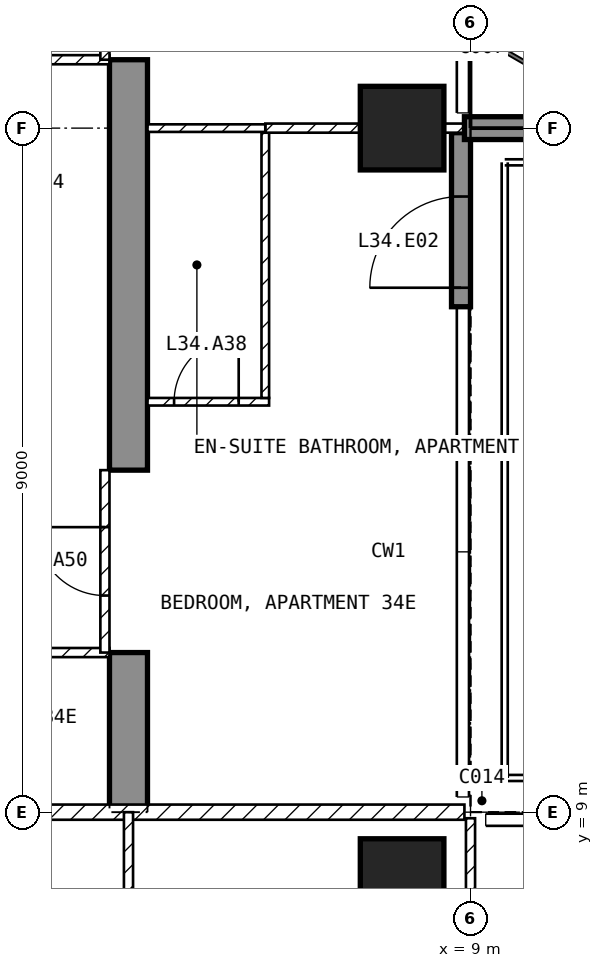
"""IFC4 building model, lengths in metres.
Left out: names, types, materials, properties, quantities, classifications, styles, units other than length and angle.
Written with IfcOpenShell. Run it as: python <this file> out.ifc"""

import sys

from ifc_helpers import new_model, si_unit, direction, frame, frame_2d, origin, origin_2d, place, context, subcontext, project, spatial, polyline, rectangle, outline, extrude, element, fill, save


model = new_model("IFC4")
c1 = context("Model", 3, precision=1e-05, world=origin(), true_north=direction((0.0, 1.0)))
c2 = subcontext(c1, "Body", "Model", "MODEL_VIEW")
j1 = project(units=[si_unit("LENGTHUNIT", "METRE"), si_unit("PLANEANGLEUNIT", "RADIAN")], contexts=[c1])
p1 = place(None, origin())
s1 = spatial("IfcSite", under=j1, at=p1, CompositionType="ELEMENT")
p2 = place(p1, origin())
s2 = spatial("IfcBuilding", under=s1, at=p2, CompositionType="ELEMENT")
p3 = place(p2, frame((0.0, 0.0, 140.9)))
s3 = spatial("IfcBuildingStorey", under=s2, at=p3, CompositionType="ELEMENT", Elevation=140.9)
for number, where, z_axis, x_axis in (
    (1, (8.1, 8.1, -0.25), (0.0, 0.0, 1.0), (1.0, 0.0, 0.0)),
    (2, (8.1, 18.0, -0.25), (0.0, 0.0, 1.0), (1.0, 0.0, 0.0)),
):
    element("IfcColumn", number, at=place(p3, frame(where, z_axis=z_axis, x_axis=x_axis)), inside=s3, PredefinedType="COLUMN", context=c2, shape_type="SweptSolid", body=[
        extrude(rectangle(XDim=1.1, YDim=1.1, at=origin_2d()), origin(), (0.0, 0.0, 1.0), 3.5),
    ])
p4 = place(p3, frame((4.25, 9.0, -0.25), z_axis=(1.0, 0.0, 0.0), x_axis=(0.0, 1.0, 0.0)))
e3 = element("IfcWall", 3, at=p4, inside=s3, PredefinedType="SHEAR", context=c2, shape_type="SweptSolid", body=[
    extrude(outline(polyline([(0.0, 0.0), (2.1, 0.0), (2.1, 2.65), (4.5, 2.65), (4.5, 0.0), (9.9, 0.0), (9.9, 2.65), (12.3, 2.65), (12.3, 0.0), (16.55, 0.0), (16.55, 3.5), (0.0, 3.5), (0.0, 0.0)])), origin(), (0.0, 0.0, 1.0), 0.5),
])
p5 = place(p3, frame((8.875, 15.65, 0.0), z_axis=(0.0, 0.0, 1.0), x_axis=(0.0, 1.0, 0.0)))
e4 = element("IfcWall", 4, at=p5, inside=s3, PredefinedType="SOLIDWALL", context=c2, shape_type="SweptSolid", body=[
    extrude(rectangle(XDim=2.29, YDim=0.25, at=frame_2d((1.145, 0.0))), origin(), (0.0, 0.0, 1.0), 3.25),
])
p6 = place(p5, frame((0.25, 0.0, 0.0)))
e5 = element("IfcOpeningElement", 5, at=p6, cuts=e4, PredefinedType="OPENING", context=c2, shape_type="SweptSolid", body=[
    extrude(rectangle(XDim=1.2, YDim=2.4, at=frame_2d((0.6, 1.2))), frame((0.0, 0.135, 0.0), z_axis=(0.0, -1.0, 0.0), x_axis=(1.0, 0.0, 0.0)), (0.0, 0.0, 1.0), 0.27),
])
p7 = place(p3, frame((8.92, 18.0, 0.0), z_axis=(0.0, 0.0, 1.0), x_axis=(1.0, 0.0, 0.0)))
e6 = element("IfcWall", 6, at=p7, inside=s3, PredefinedType="SOLIDWALL", context=c2, shape_type="SweptSolid", body=[
    extrude(rectangle(XDim=2.82, YDim=0.3, at=frame_2d((1.41, 0.0))), origin(), (0.0, 0.0, 1.0), 3.25),
])
p8 = place(p3, frame((-8.92, 9.0, 0.0), z_axis=(0.0, 0.0, 1.0), x_axis=(1.0, 0.0, 0.0)))
e7 = element("IfcWall", 7, at=p8, inside=s3, PredefinedType="PARTITIONING", context=c2, shape_type="SweptSolid", body=[
    extrude(rectangle(XDim=17.84, YDim=0.2, at=frame_2d((8.92, 0.0))), origin(), (0.0, 0.0, 1.0), 3.25),
])
p9 = place(p8, frame((8.42, 0.0, 0.0)))
e8 = element("IfcOpeningElement", 8, at=p9, cuts=e7, PredefinedType="OPENING", context=c2, shape_type="SweptSolid", body=[
    extrude(rectangle(XDim=1.0, YDim=2.1, at=frame_2d((0.5, 1.05))), frame((0.0, 0.11, 0.0), z_axis=(0.0, -1.0, 0.0), x_axis=(1.0, 0.0, 0.0)), (0.0, 0.0, 1.0), 0.22),
])
p10 = place(p3, frame((9.0, 1.3, 0.0), z_axis=(0.0, 0.0, 1.0), x_axis=(0.0, 1.0, 0.0)))
e9 = element("IfcWall", 9, at=p10, inside=s3, PredefinedType="PARTITIONING", context=c2, shape_type="SweptSolid", body=[
    extrude(rectangle(XDim=7.62, YDim=0.12, at=frame_2d((3.81, 0.0))), origin(), (0.0, 0.0, 1.0), 3.25),
])
p11 = place(p10, frame((4.1, 0.0, 0.0)))
e10 = element("IfcOpeningElement", 10, at=p11, cuts=e9, PredefinedType="OPENING", context=c2, shape_type="SweptSolid", body=[
    extrude(rectangle(XDim=0.9, YDim=2.1, at=frame_2d((0.45, 1.05))), frame((0.0, 0.07, 0.0), z_axis=(0.0, -1.0, 0.0), x_axis=(1.0, 0.0, 0.0)), (0.0, 0.0, 1.0), 0.14),
])
p12 = place(p3, frame((4.5, 4.5, 0.0), z_axis=(0.0, 0.0, 1.0), x_axis=(0.0, 1.0, 0.0)))
e11 = element("IfcWall", 11, at=p12, inside=s3, PredefinedType="PARTITIONING", context=c2, shape_type="SweptSolid", body=[
    extrude(rectangle(XDim=4.5, YDim=0.12, at=frame_2d((2.25, 0.0))), origin(), (0.0, 0.0, 1.0), 3.25),
])
p13 = place(p12, frame((1.8, 0.0, 0.0)))
e12 = element("IfcOpeningElement", 12, at=p13, cuts=e11, PredefinedType="OPENING", context=c2, shape_type="SweptSolid", body=[
    extrude(rectangle(XDim=0.9, YDim=2.1, at=frame_2d((0.45, 1.05))), frame((0.0, 0.07, 0.0), z_axis=(0.0, -1.0, 0.0), x_axis=(1.0, 0.0, 0.0)), (0.0, 0.0, 1.0), 0.14),
])
p14 = place(p3, frame((-2.1, 11.1, 0.0), z_axis=(0.0, 0.0, 1.0), x_axis=(1.0, 0.0, 0.0)))
e13 = element("IfcWall", 13, at=p14, inside=s3, PredefinedType="PARTITIONING", context=c2, shape_type="SweptSolid", body=[
    extrude(rectangle(XDim=6.35, YDim=0.12, at=frame_2d((3.175, 0.0))), origin(), (0.0, 0.0, 1.0), 3.25),
])
p15 = place(p14, frame((2.725, 0.0, 0.0)))
e14 = element("IfcOpeningElement", 14, at=p15, cuts=e13, PredefinedType="OPENING", context=c2, shape_type="SweptSolid", body=[
    extrude(rectangle(XDim=0.9, YDim=2.1, at=frame_2d((0.45, 1.05))), frame((0.0, 0.07, 0.0), z_axis=(0.0, -1.0, 0.0), x_axis=(1.0, 0.0, 0.0)), (0.0, 0.0, 1.0), 0.14),
])
p16 = place(p3, frame((-4.25, 18.9, 0.0), z_axis=(0.0, 0.0, 1.0), x_axis=(1.0, 0.0, 0.0)))
e15 = element("IfcWall", 15, at=p16, inside=s3, PredefinedType="PARTITIONING", context=c2, shape_type="SweptSolid", body=[
    extrude(rectangle(XDim=8.5, YDim=0.12, at=frame_2d((4.25, 0.0))), origin(), (0.0, 0.0, 1.0), 3.25),
])
p17 = place(p16, frame((5.675, 0.0, 0.0)))
e16 = element("IfcOpeningElement", 16, at=p17, cuts=e15, PredefinedType="OPENING", context=c2, shape_type="SweptSolid", body=[
    extrude(rectangle(XDim=0.9, YDim=2.1, at=frame_2d((0.45, 1.05))), frame((0.0, 0.07, 0.0), z_axis=(0.0, -1.0, 0.0), x_axis=(1.0, 0.0, 0.0)), (0.0, 0.0, 1.0), 0.14),
])
p18 = place(p3, frame((4.75, 14.4, 0.0), z_axis=(0.0, 0.0, 1.0), x_axis=(1.0, 0.0, 0.0)))
e17 = element("IfcWall", 17, at=p18, inside=s3, PredefinedType="PARTITIONING", context=c2, shape_type="SweptSolid", body=[
    extrude(rectangle(XDim=1.6, YDim=0.1, at=frame_2d((0.8, 0.0))), origin(), (0.0, 0.0, 1.0), 3.25),
])
p19 = place(p18, frame((0.35, 0.0, 0.0)))
e18 = element("IfcOpeningElement", 18, at=p19, cuts=e17, PredefinedType="OPENING", context=c2, shape_type="SweptSolid", body=[
    extrude(rectangle(XDim=0.85, YDim=2.1, at=frame_2d((0.425, 1.05))), frame((0.0, 0.06, 0.0), z_axis=(0.0, -1.0, 0.0), x_axis=(1.0, 0.0, 0.0)), (0.0, 0.0, 1.0), 0.12),
])
p20 = place(p3, frame((6.3, 14.45, 0.0), z_axis=(0.0, 0.0, 1.0), x_axis=(0.0, 1.0, 0.0)))
e19 = element("IfcWall", 19, at=p20, inside=s3, PredefinedType="PARTITIONING", context=c2, shape_type="SweptSolid", body=[
    extrude(rectangle(XDim=3.49, YDim=0.1, at=frame_2d((1.745, 0.0))), origin(), (0.0, 0.0, 1.0), 3.25),
])
p21 = place(p3, frame((6.3, 18.0, 0.0), z_axis=(0.0, 0.0, 1.0), x_axis=(1.0, 0.0, 0.0)))
e20 = element("IfcWall", 20, at=p21, inside=s3, PredefinedType="PARTITIONING", context=c2, shape_type="SweptSolid", body=[
    extrude(rectangle(XDim=2.62, YDim=0.12, at=frame_2d((1.31, 0.0))), origin(), (0.0, 0.0, 1.0), 2.414),
])
p22 = place(p3, frame((4.75, 18.0, 0.0), z_axis=(0.0, 0.0, 1.0), x_axis=(1.0, 0.0, 0.0)))
e21 = element("IfcWall", 21, at=p22, inside=s3, PredefinedType="PARTITIONING", context=c2, shape_type="SweptSolid", body=[
    extrude(rectangle(XDim=1.55, YDim=0.1, at=frame_2d((0.775, 0.0))), origin(), (0.0, 0.0, 1.0), 2.414),
])
p23 = place(p3, frame((4.19, 11.1, 0.0), z_axis=(0.0, 0.0, 1.0), x_axis=(0.0, 1.0, 0.0)))
e22 = element("IfcWall", 22, at=p23, inside=s3, PredefinedType="PARTITIONING", context=c2, shape_type="SweptSolid", body=[
    extrude(rectangle(XDim=2.4, YDim=0.12, at=frame_2d((1.2, 0.0))), origin(), (0.0, 0.0, 1.0), 2.4),
])
p24 = place(p23, frame((0.75, 0.0, 0.0)))
e23 = element("IfcOpeningElement", 23, at=p24, cuts=e22, PredefinedType="OPENING", context=c2, shape_type="SweptSolid", body=[
    extrude(rectangle(XDim=0.9, YDim=2.1, at=frame_2d((0.45, 1.05))), frame((0.0, 0.07, 0.0), z_axis=(0.0, -1.0, 0.0), x_axis=(1.0, 0.0, 0.0)), (0.0, 0.0, 1.0), 0.14),
])
p25 = place(p3, frame((4.19, 18.9, 0.0), z_axis=(0.0, 0.0, 1.0), x_axis=(0.0, 1.0, 0.0)))
e24 = element("IfcWall", 24, at=p25, inside=s3, PredefinedType="PARTITIONING", context=c2, shape_type="SweptSolid", body=[
    extrude(rectangle(XDim=2.4, YDim=0.12, at=frame_2d((1.2, 0.0))), origin(), (0.0, 0.0, 1.0), 2.4),
])
p26 = place(p25, frame((0.75, 0.0, 0.0)))
e25 = element("IfcOpeningElement", 25, at=p26, cuts=e24, PredefinedType="OPENING", context=c2, shape_type="SweptSolid", body=[
    extrude(rectangle(XDim=0.9, YDim=2.1, at=frame_2d((0.45, 1.05))), frame((0.0, 0.07, 0.0), z_axis=(0.0, -1.0, 0.0), x_axis=(1.0, 0.0, 0.0)), (0.0, 0.0, 1.0), 0.14),
])
p27 = place(p6, origin())
e26 = element("IfcDoor", 26, at=p27, inside=s3, OperationType="SINGLE_SWING_LEFT", PredefinedType="DOOR", context=c2, shape_type="SweptSolid", body=[
    extrude(rectangle(XDim=1.2, YDim=2.4, at=frame_2d((0.6, 1.2))), frame((0.0, 0.025, 0.0), z_axis=(0.0, -1.0, 0.0), x_axis=(1.0, 0.0, 0.0)), (0.0, 0.0, 1.0), 0.05),
])
fill(e5, e26)
p28 = place(p19, origin())
e27 = element("IfcDoor", 27, at=p28, inside=s3, OperationType="SINGLE_SWING_RIGHT", PredefinedType="DOOR", context=c2, shape_type="SweptSolid", body=[
    extrude(rectangle(XDim=0.85, YDim=2.1, at=frame_2d((0.425, 1.05))), frame((0.0, 0.025, 0.0), z_axis=(0.0, -1.0, 0.0), x_axis=(1.0, 0.0, 0.0)), (0.0, 0.0, 1.0), 0.05),
])
fill(e18, e27)
p29 = place(p24, origin())
e28 = element("IfcDoor", 28, at=p29, inside=s3, OperationType="SINGLE_SWING_RIGHT", PredefinedType="DOOR", context=c2, shape_type="SweptSolid", body=[
    extrude(rectangle(XDim=0.9, YDim=2.1, at=frame_2d((0.45, 1.05))), frame((0.0, 0.025, 0.0), z_axis=(0.0, -1.0, 0.0), x_axis=(1.0, 0.0, 0.0)), (0.0, 0.0, 1.0), 0.05),
])
fill(e23, e28)
save(model, sys.argv[1])
